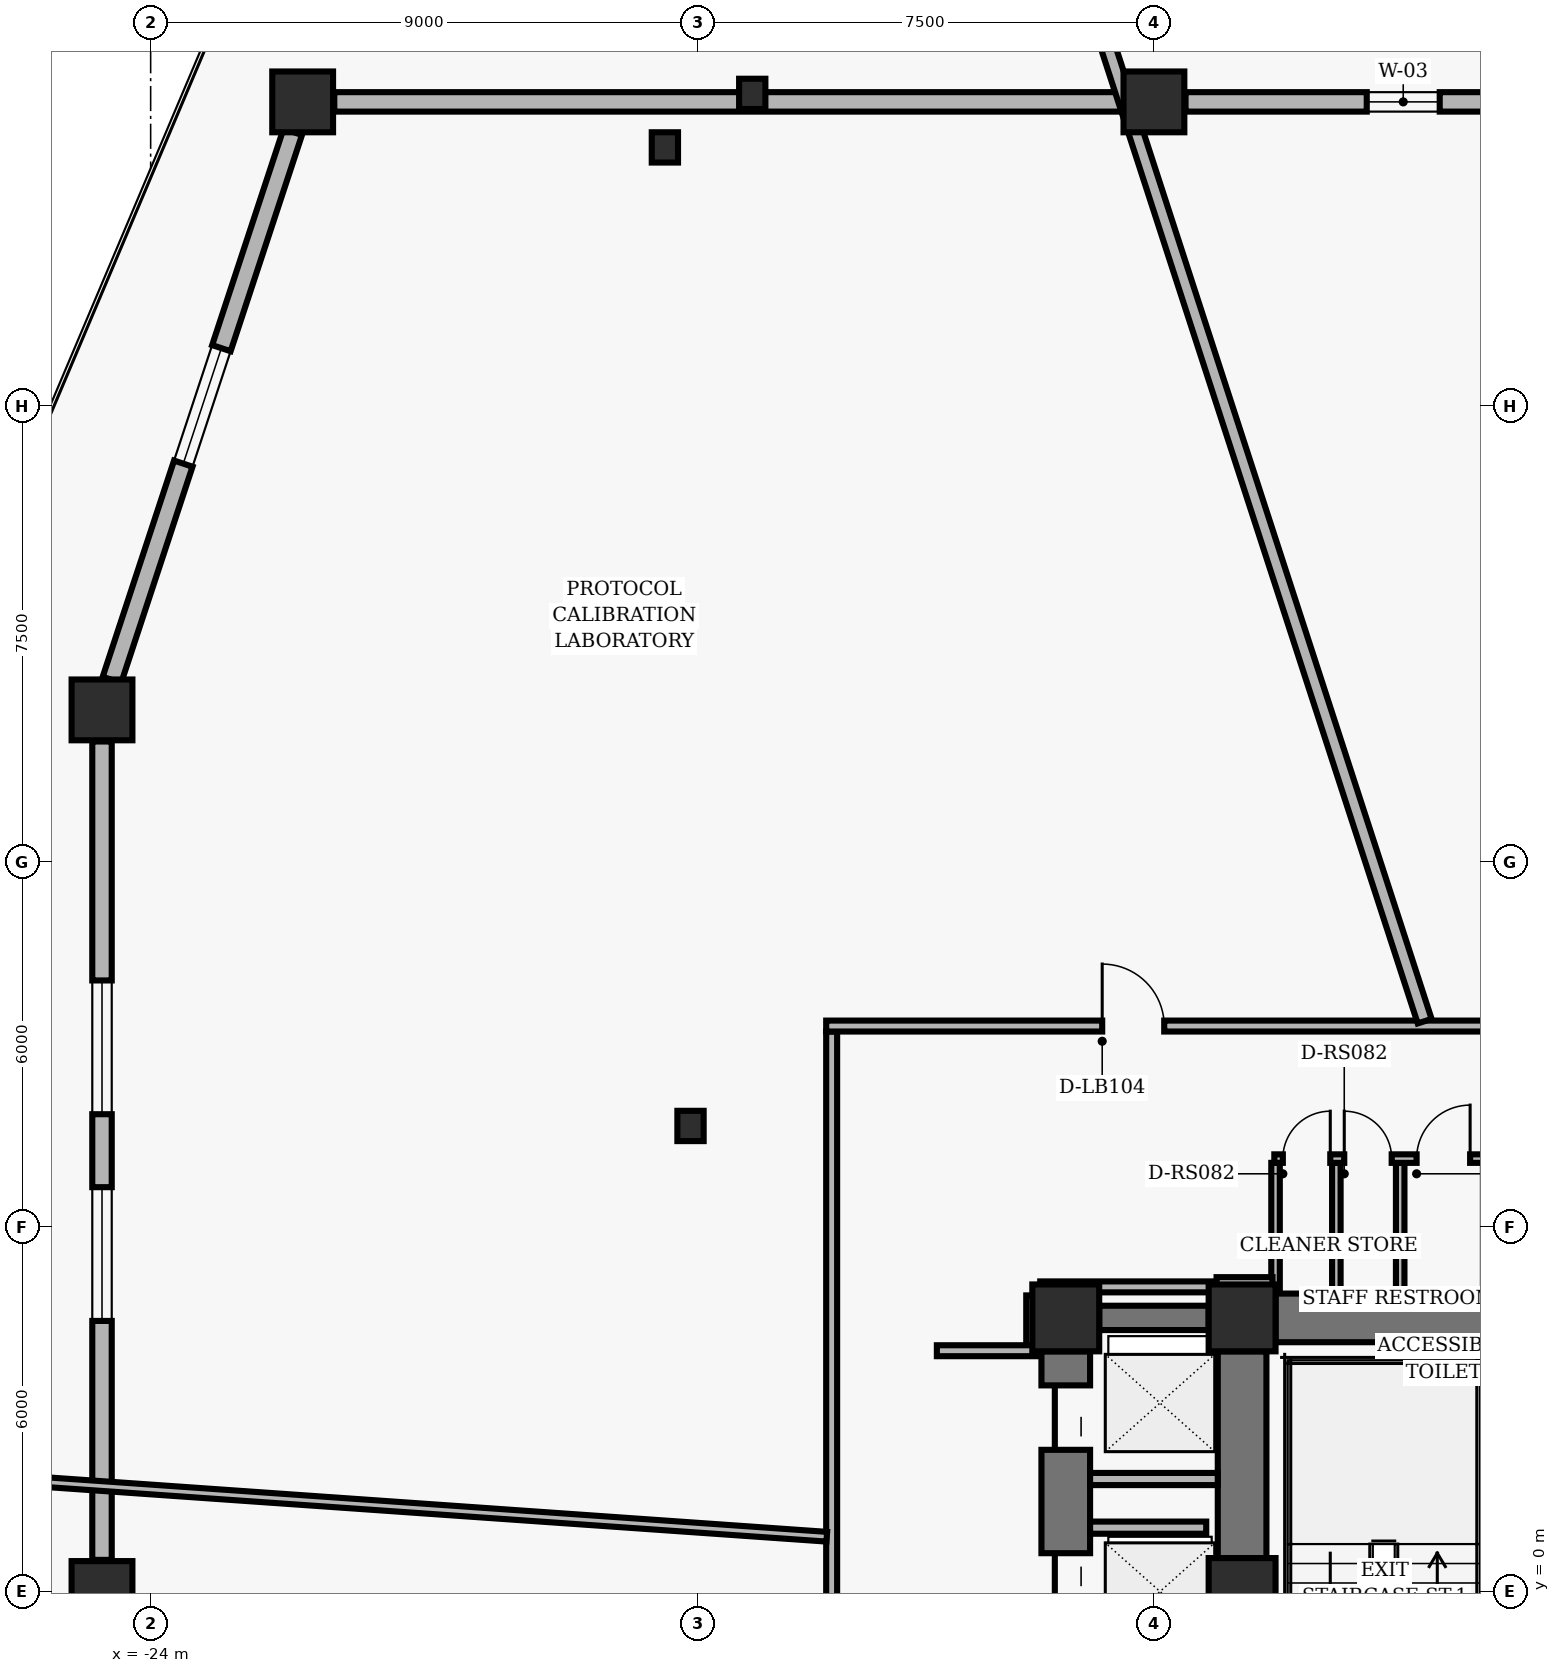
"""IFC4 building model, lengths in metres.
Left out: names, types, materials, properties, quantities, classifications, styles, units other than length and angle.
Written with IfcOpenShell. Run it as: python <this file> out.ifc"""

import sys

from ifc_helpers import new_model, si_unit, direction, frame, frame_2d, origin, origin_2d, place, context, subcontext, project, spatial, rectangle, hollow_rectangle, i_section, extrude, element, fill, save


model = new_model("IFC4")
c1 = context("Model", 3, precision=1e-05, world=origin(), true_north=direction((0.0, 1.0)))
c2 = subcontext(c1, "Body", "Model", "MODEL_VIEW")
j1 = project(units=[si_unit("LENGTHUNIT", "METRE"), si_unit("PLANEANGLEUNIT", "RADIAN")], contexts=[c1])
p1 = place(None, origin())
s1 = spatial("IfcSite", under=j1, at=p1, CompositionType="ELEMENT")
p2 = place(p1, origin())
s2 = spatial("IfcBuilding", under=s1, at=p2, CompositionType="ELEMENT")
p3 = place(p2, frame((0.0, 0.0, 11.84)))
s3 = spatial("IfcBuildingStorey", under=s2, at=p3, CompositionType="ELEMENT", Elevation=11.84)
for number, where, z_axis, x_axis in (
    (1, (-6.05, 4.5, 0.0), (0.0, 0.0, 1.0), (1.0, 0.0, 0.0)),
    (2, (-6.05, 0.0, 0.0), (0.0, 0.0, 1.0), (1.0, 0.0, 0.0)),
    (3, (-8.95, 4.5, 0.0), (0.0, 0.0, 1.0), (1.0, 0.0, 0.0)),
):
    element("IfcColumn", number, at=place(p3, frame(where, z_axis=z_axis, x_axis=x_axis)), inside=s3, PredefinedType="COLUMN", context=c2, shape_type="SweptSolid", body=[
        extrude(hollow_rectangle(XDim=1.1, YDim=1.1, WallThickness=0.07, InnerFilletRadius=0.02, OuterFilletRadius=0.04, at=origin_2d()), origin(), (0.0, 0.0, 1.0), 3.52),
    ])
p4 = place(p3, frame((-6.05, 0.55, 0.0), z_axis=(0.0, 0.0, 1.0), x_axis=(0.0, 1.0, 0.0)))
e4 = element("IfcWall", 4, at=p4, inside=s3, PredefinedType="SHEAR", context=c2, shape_type="SweptSolid", body=[
    extrude(rectangle(XDim=3.4, YDim=0.8, at=frame_2d((1.7, 0.0))), origin(), (0.0, 0.0, 1.0), 3.178),
])
p5 = place(p3, frame((-5.5, 4.5, 0.0), z_axis=(0.0, 0.0, 1.0), x_axis=(1.0, 0.0, 0.0)))
e5 = element("IfcWall", 5, at=p5, inside=s3, PredefinedType="SHEAR", context=c2, shape_type="SweptSolid", body=[
    extrude(rectangle(XDim=3.45, YDim=0.8, at=frame_2d((1.725, 0.0))), origin(), (0.0, 0.0, 1.0), 3.178),
])
p6 = place(p3, frame((-8.95, -3.75, 0.0), z_axis=(0.0, 0.0, 1.0), x_axis=(0.0, 1.0, 0.0)))
e6 = element("IfcWall", 6, at=p6, inside=s3, PredefinedType="SHEAR", context=c2, shape_type="SweptSolid", body=[
    extrude(rectangle(XDim=7.7, YDim=0.8, at=frame_2d((3.85, 0.0))), origin(), (0.0, 0.0, 1.0), 3.178),
])
p7 = place(p6, frame((0.55, 0.0, 0.0)))
e7 = element("IfcOpeningElement", 7, at=p7, cuts=e6, PredefinedType="OPENING", context=c2, shape_type="SweptSolid", body=[
    extrude(rectangle(XDim=1.06, YDim=2.04, at=frame_2d((0.53, 1.02))), frame((0.0, 0.41, 0.0), z_axis=(0.0, -1.0, 0.0), x_axis=(1.0, 0.0, 0.0)), (0.0, 0.0, 1.0), 0.82),
])
p8 = place(p6, frame((3.32, 0.0, 0.0)))
e8 = element("IfcOpeningElement", 8, at=p8, cuts=e6, PredefinedType="OPENING", context=c2, shape_type="SweptSolid", body=[
    extrude(rectangle(XDim=1.06, YDim=2.04, at=frame_2d((0.53, 1.02))), frame((0.0, 0.41, 0.0), z_axis=(0.0, -1.0, 0.0), x_axis=(1.0, 0.0, 0.0)), (0.0, 0.0, 1.0), 0.82),
])
p9 = place(p6, frame((6.08, 0.0, 0.0)))
e9 = element("IfcOpeningElement", 9, at=p9, cuts=e6, PredefinedType="OPENING", context=c2, shape_type="SweptSolid", body=[
    extrude(rectangle(XDim=1.06, YDim=2.04, at=frame_2d((0.53, 1.02))), frame((0.0, 0.41, 0.0), z_axis=(0.0, -1.0, 0.0), x_axis=(1.0, 0.0, 0.0)), (0.0, 0.0, 1.0), 0.82),
])
p10 = place(p3, frame((-8.4, 4.5, 0.0), z_axis=(0.0, 0.0, 1.0), x_axis=(1.0, 0.0, 0.0)))
e10 = element("IfcWall", 10, at=p10, inside=s3, PredefinedType="SHEAR", context=c2, shape_type="SweptSolid", body=[
    extrude(rectangle(XDim=1.8, YDim=0.4, at=frame_2d((0.9, 0.0))), origin(), (0.0, 0.0, 1.0), 3.178),
])
for number, where, z_axis, x_axis in (
    (11, (-7.5, 24.5, 0.0), (0.0, 0.0, 1.0), (1.0, 0.0, 0.0)),
    (12, (-21.5, 24.5, 0.0), (0.0, 0.0, 1.0), (1.0, 0.0, 0.0)),
    (13, (-24.8, 14.5, 0.0), (0.0, 0.0, 1.0), (1.0, 0.0, 0.0)),
    (14, (-24.8, 0.0, 0.0), (0.0, 0.0, 1.0), (1.0, 0.0, 0.0)),
):
    element("IfcColumn", number, at=place(p3, frame(where, z_axis=z_axis, x_axis=x_axis)), inside=s3, PredefinedType="COLUMN", context=c2, shape_type="SweptSolid", body=[
        extrude(rectangle(XDim=1.0, YDim=1.0, at=origin_2d()), origin(), (0.0, 0.0, 1.0), 3.52),
    ])
for number, where, z_axis, x_axis in (
    (15, (-14.106, 24.632, 0.0), (0.0, 0.0, 1.0), (1.0, 0.0, 0.0)),
    (16, (-15.543, 23.751, 0.0), (0.0, 0.0, 1.0), (1.0, 0.0, 0.0)),
    (17, (-15.121, 7.657, 0.0), (0.0, 0.0, 1.0), (1.0, 0.0, 0.0)),
):
    element("IfcColumn", number, at=place(p3, frame(where, z_axis=z_axis, x_axis=x_axis)), inside=s3, PredefinedType="COLUMN", context=c2, shape_type="SweptSolid", body=[
        extrude(i_section(OverallWidth=0.432, OverallDepth=0.498, WebThickness=0.056, FlangeThickness=0.089, FilletRadius=0.025, at=origin_2d()), origin(), (0.0, 0.0, 1.0), 3.52),
    ])
p11 = place(p3, frame((-6.98, 24.5, 0.0), z_axis=(0.0, 0.0, 1.0), x_axis=(1.0, 0.0, 0.0)))
e18 = element("IfcWall", 18, at=p11, inside=s3, PredefinedType="SOLIDWALL", context=c2, shape_type="SweptSolid", body=[
    extrude(rectangle(XDim=11.96, YDim=0.32, at=frame_2d((5.98, 0.0))), origin(), (0.0, 0.0, 1.0), 2.548),
])
p12 = place(p11, frame((2.98, 0.0, 0.65)))
e19 = element("IfcOpeningElement", 19, at=p12, cuts=e18, PredefinedType="OPENING", context=c2, shape_type="SweptSolid", body=[
    extrude(rectangle(XDim=1.2, YDim=1.6, at=frame_2d((0.6, 0.8))), frame((0.0, 0.17, 0.0), z_axis=(0.0, -1.0, 0.0), x_axis=(1.0, 0.0, 0.0)), (0.0, 0.0, 1.0), 0.34),
])
p13 = place(p11, frame((5.38, 0.0, 0.65)))
e20 = element("IfcOpeningElement", 20, at=p13, cuts=e18, PredefinedType="OPENING", context=c2, shape_type="SweptSolid", body=[
    extrude(rectangle(XDim=1.2, YDim=1.6, at=frame_2d((0.6, 0.8))), frame((0.0, 0.17, 0.0), z_axis=(0.0, -1.0, 0.0), x_axis=(1.0, 0.0, 0.0)), (0.0, 0.0, 1.0), 0.34),
])
p14 = place(p11, frame((7.78, 0.0, 0.65)))
e21 = element("IfcOpeningElement", 21, at=p14, cuts=e18, PredefinedType="OPENING", context=c2, shape_type="SweptSolid", body=[
    extrude(rectangle(XDim=1.2, YDim=1.6, at=frame_2d((0.6, 0.8))), frame((0.0, 0.17, 0.0), z_axis=(0.0, -1.0, 0.0), x_axis=(1.0, 0.0, 0.0)), (0.0, 0.0, 1.0), 0.34),
])
p15 = place(p3, frame((-20.98, 24.5, 0.0), z_axis=(0.0, 0.0, 1.0), x_axis=(1.0, 0.0, 0.0)))
e22 = element("IfcWall", 22, at=p15, inside=s3, PredefinedType="SOLIDWALL", context=c2, shape_type="SweptSolid", body=[
    extrude(rectangle(XDim=12.96, YDim=0.32, at=frame_2d((6.48, 0.0))), origin(), (0.0, 0.0, 1.0), 2.548),
])
p16 = place(p3, frame((-24.637, 14.994, 0.0), z_axis=(0.0, 0.0, 1.0), x_axis=(0.313363070681, 0.949633395544, 0.0)))
e23 = element("IfcWall", 23, at=p16, inside=s3, PredefinedType="SOLIDWALL", context=c2, shape_type="SweptSolid", body=[
    extrude(rectangle(XDim=9.49, YDim=0.32, at=frame_2d((4.745, 0.0))), origin(), (0.0, 0.0, 1.0), 2.548),
])
p17 = place(p16, frame((3.745, 0.0, 0.65)))
e24 = element("IfcOpeningElement", 24, at=p17, cuts=e23, PredefinedType="OPENING", context=c2, shape_type="SweptSolid", body=[
    extrude(rectangle(XDim=2.0, YDim=1.6, at=frame_2d((1.0, 0.8))), frame((0.0, 0.17, 0.0), z_axis=(0.0, -1.0, 0.0), x_axis=(1.0, 0.0, 0.0)), (0.0, 0.0, 1.0), 0.34),
])
p18 = place(p3, frame((-24.8, 0.52, 0.0), z_axis=(0.0, 0.0, 1.0), x_axis=(0.0, 1.0, 0.0)))
e25 = element("IfcWall", 25, at=p18, inside=s3, PredefinedType="SOLIDWALL", context=c2, shape_type="SweptSolid", body=[
    extrude(rectangle(XDim=13.46, YDim=0.32, at=frame_2d((6.73, 0.0))), origin(), (0.0, 0.0, 1.0), 2.221),
])
p19 = place(p18, frame((3.93, 0.0, 0.4)))
e26 = element("IfcOpeningElement", 26, at=p19, cuts=e25, PredefinedType="OPENING", context=c2, shape_type="SweptSolid", body=[
    extrude(rectangle(XDim=2.2, YDim=1.1, at=frame_2d((1.1, 0.55))), frame((0.0, 0.17, 0.0), z_axis=(0.0, -1.0, 0.0), x_axis=(1.0, 0.0, 0.0)), (0.0, 0.0, 1.0), 0.34),
])
p20 = place(p18, frame((7.33, 0.0, 0.4)))
e27 = element("IfcOpeningElement", 27, at=p20, cuts=e25, PredefinedType="OPENING", context=c2, shape_type="SweptSolid", body=[
    extrude(rectangle(XDim=2.2, YDim=1.1, at=frame_2d((1.1, 0.55))), frame((0.0, 0.17, 0.0), z_axis=(0.0, -1.0, 0.0), x_axis=(1.0, 0.0, 0.0)), (0.0, 0.0, 1.0), 0.34),
])
for number, where, z_axis, x_axis in (
    (28, (-5.5, 4.95, 0.0), (0.0, 0.0, 1.0), (0.0, 1.0, 0.0)),
    (29, (-4.5, 4.95, 0.0), (0.0, 0.0, 1.0), (0.0, 1.0, 0.0)),
    (30, (-3.45, 4.95, 0.0), (0.0, 0.0, 1.0), (0.0, 1.0, 0.0)),
):
    element("IfcWall", number, at=place(p3, frame(where, z_axis=z_axis, x_axis=x_axis)), inside=s3, PredefinedType="PARTITIONING", context=c2, shape_type="SweptSolid", body=[
        extrude(rectangle(XDim=2.1, YDim=0.14, at=frame_2d((1.05, 0.0))), origin(), (0.0, 0.0, 1.0), 3.153),
    ])
p21 = place(p3, frame((-5.52, 7.12, 0.0), z_axis=(0.0, 0.0, 1.0), x_axis=(1.0, 0.0, 0.0)))
e31 = element("IfcWall", 31, at=p21, inside=s3, PredefinedType="PARTITIONING", context=c2, shape_type="SweptSolid", body=[
    extrude(rectangle(XDim=3.52, YDim=0.14, at=frame_2d((1.76, 0.0))), origin(), (0.0, 0.0, 1.0), 3.153),
])
p22 = place(p21, frame((0.14, 0.0, 0.0)))
e32 = element("IfcOpeningElement", 32, at=p22, cuts=e31, PredefinedType="OPENING", context=c2, shape_type="SweptSolid", body=[
    extrude(rectangle(XDim=0.78, YDim=2.01, at=frame_2d((0.39, 1.005))), frame((0.0, 0.08, 0.0), z_axis=(0.0, -1.0, 0.0), x_axis=(1.0, 0.0, 0.0)), (0.0, 0.0, 1.0), 0.16),
])
p23 = place(p21, frame((1.15, 0.0, 0.0)))
e33 = element("IfcOpeningElement", 33, at=p23, cuts=e31, PredefinedType="OPENING", context=c2, shape_type="SweptSolid", body=[
    extrude(rectangle(XDim=0.78, YDim=2.01, at=frame_2d((0.39, 1.005))), frame((0.0, 0.08, 0.0), z_axis=(0.0, -1.0, 0.0), x_axis=(1.0, 0.0, 0.0)), (0.0, 0.0, 1.0), 0.16),
])
p24 = place(p21, frame((2.34, 0.0, 0.0)))
e34 = element("IfcOpeningElement", 34, at=p24, cuts=e31, PredefinedType="OPENING", context=c2, shape_type="SweptSolid", body=[
    extrude(rectangle(XDim=0.88, YDim=2.02, at=frame_2d((0.44, 1.01))), frame((0.0, 0.08, 0.0), z_axis=(0.0, -1.0, 0.0), x_axis=(1.0, 0.0, 0.0)), (0.0, 0.0, 1.0), 0.16),
])
p25 = place(p3, frame((-8.55, 1.85, 0.0), z_axis=(0.0, 0.0, 1.0), x_axis=(1.0, 0.0, 0.0)))
e35 = element("IfcWall", 35, at=p25, inside=s3, PredefinedType="PARTITIONING", context=c2, shape_type="SweptSolid", body=[
    extrude(rectangle(XDim=2.1, YDim=0.2, at=frame_2d((1.05, 0.0))), origin(), (0.0, 0.0, 1.0), 3.153),
])
p26 = place(p3, frame((-8.55, 1.05, 0.0), z_axis=(0.0, 0.0, 1.0), x_axis=(1.0, 0.0, 0.0)))
e36 = element("IfcWall", 36, at=p26, inside=s3, PredefinedType="PARTITIONING", context=c2, shape_type="SweptSolid", body=[
    extrude(rectangle(XDim=1.91, YDim=0.2, at=frame_2d((0.955, 0.0))), origin(), (0.0, 0.0, 1.0), 3.153),
])
p27 = place(p3, frame((-12.8, -3.61, 0.0), z_axis=(0.0, 0.0, 1.0), x_axis=(0.0, 1.0, 0.0)))
e37 = element("IfcWall", 37, at=p27, inside=s3, PredefinedType="PARTITIONING", context=c2, shape_type="SweptSolid", body=[
    extrude(rectangle(XDim=12.82, YDim=0.18, at=frame_2d((6.41, 0.0))), origin(), (0.0, 0.0, 1.0), 3.153),
])
p28 = place(p3, frame((-12.89, 9.3, 0.0), z_axis=(0.0, 0.0, 1.0), x_axis=(1.0, 0.0, 0.0)))
e38 = element("IfcWall", 38, at=p28, inside=s3, PredefinedType="PARTITIONING", context=c2, shape_type="SweptSolid", body=[
    extrude(rectangle(XDim=25.78, YDim=0.18, at=frame_2d((12.89, 0.0))), origin(), (0.0, 0.0, 1.0), 2.72),
])
p29 = place(p28, frame((17.202, 0.0, 0.0)))
e39 = element("IfcOpeningElement", 39, at=p29, cuts=e38, PredefinedType="OPENING", context=c2, shape_type="SweptSolid", body=[
    extrude(rectangle(XDim=0.96, YDim=2.02, at=frame_2d((0.48, 1.01))), frame((0.0, 0.1, 0.0), z_axis=(0.0, -1.0, 0.0), x_axis=(1.0, 0.0, 0.0)), (0.0, 0.0, 1.0), 0.2),
])
p30 = place(p28, frame((4.539, 0.0, 0.0)))
e40 = element("IfcOpeningElement", 40, at=p30, cuts=e38, PredefinedType="OPENING", context=c2, shape_type="SweptSolid", body=[
    extrude(rectangle(XDim=1.02, YDim=2.02, at=frame_2d((0.51, 1.01))), frame((0.0, 0.1, 0.0), z_axis=(0.0, -1.0, 0.0), x_axis=(1.0, 0.0, 0.0)), (0.0, 0.0, 1.0), 0.2),
])
p31 = place(p3, frame((-5.55, 5.08, 0.0), z_axis=(0.0, 0.0, 1.0), x_axis=(-1.0, 0.0, 0.0)))
e41 = element("IfcWall", 41, at=p31, inside=s3, PredefinedType="PARTITIONING", context=c2, shape_type="SweptSolid", body=[
    extrude(rectangle(XDim=0.92, YDim=0.18, at=frame_2d((0.46, 0.0))), origin(), (0.0, 0.0, 1.0), 3.153),
])
p32 = place(p3, frame((-6.562, 5.01, 0.0), z_axis=(0.0, 0.0, 1.0), x_axis=(-1.0, 0.0, 0.0)))
e42 = element("IfcWall", 42, at=p32, inside=s3, PredefinedType="PARTITIONING", context=c2, shape_type="SweptSolid", body=[
    extrude(rectangle(XDim=2.808, YDim=0.18, at=frame_2d((1.404, 0.0))), origin(), (0.0, 0.0, 1.0), 3.153),
])
p33 = place(p3, frame((-9.51, 4.87, 0.0), z_axis=(0.0, 0.0, 1.0), x_axis=(0.0, -1.0, 0.0)))
e43 = element("IfcWall", 43, at=p33, inside=s3, PredefinedType="PARTITIONING", context=c2, shape_type="SweptSolid", body=[
    extrude(rectangle(XDim=0.82, YDim=0.18, at=frame_2d((0.41, 0.0))), origin(), (0.0, 0.0, 1.0), 3.153),
])
p34 = place(p3, frame((-9.42, 3.96, 0.0), z_axis=(0.0, 0.0, 1.0), x_axis=(-1.0, 0.0, 0.0)))
e44 = element("IfcWall", 44, at=p34, inside=s3, PredefinedType="PARTITIONING", context=c2, shape_type="SweptSolid", body=[
    extrude(rectangle(XDim=1.65, YDim=0.18, at=frame_2d((0.825, 0.0))), origin(), (0.0, 0.0, 1.0), 3.153),
])
p35 = place(p3, frame((-3.048, 9.38, 0.0), z_axis=(0.0, 0.0, 1.0), x_axis=(-0.309026872476, 0.951053306649, 0.0)))
e45 = element("IfcWall", 45, at=p35, inside=s3, PredefinedType="PARTITIONING", context=c2, shape_type="SweptSolid", body=[
    extrude(rectangle(XDim=18.464, YDim=0.24, at=frame_2d((9.232, 0.0))), origin(), (0.0, 0.0, 1.0), 2.206),
])
p36 = place(p3, frame((-12.88, 0.901, 0.0), z_axis=(0.0, 0.0, 1.0), x_axis=(-0.99756431173, 0.069752734445, 0.0)))
e46 = element("IfcWall", 46, at=p36, inside=s3, PredefinedType="PARTITIONING", context=c2, shape_type="SweptSolid", body=[
    extrude(rectangle(XDim=13.643, YDim=0.16, at=frame_2d((6.822, 0.0))), origin(), (0.0, 0.0, 1.0), 3.153),
])
p37 = place(p12, origin())
e47 = element("IfcWindow", 47, at=p37, inside=s3, PartitioningType="SINGLE_PANEL", PredefinedType="WINDOW", context=c2, shape_type="SweptSolid", body=[
    extrude(rectangle(XDim=1.2, YDim=1.6, at=frame_2d((0.6, 0.8))), frame((0.0, 0.03, 0.0), z_axis=(0.0, -1.0, 0.0), x_axis=(1.0, 0.0, 0.0)), (0.0, 0.0, 1.0), 0.06),
])
fill(e19, e47)
p38 = place(p17, origin())
e48 = element("IfcWindow", 48, at=p38, inside=s3, PartitioningType="SINGLE_PANEL", PredefinedType="WINDOW", context=c2, shape_type="SweptSolid", body=[
    extrude(rectangle(XDim=2.0, YDim=1.6, at=frame_2d((1.0, 0.8))), frame((0.0, 0.03, 0.0), z_axis=(0.0, -1.0, 0.0), x_axis=(1.0, 0.0, 0.0)), (0.0, 0.0, 1.0), 0.06),
])
fill(e24, e48)
p39 = place(p19, origin())
e49 = element("IfcWindow", 49, at=p39, inside=s3, PartitioningType="SINGLE_PANEL", PredefinedType="WINDOW", context=c2, shape_type="SweptSolid", body=[
    extrude(rectangle(XDim=2.2, YDim=1.1, at=frame_2d((1.1, 0.55))), frame((0.0, 0.03, 0.0), z_axis=(0.0, -1.0, 0.0), x_axis=(1.0, 0.0, 0.0)), (0.0, 0.0, 1.0), 0.06),
])
fill(e26, e49)
p40 = place(p20, origin())
e50 = element("IfcWindow", 50, at=p40, inside=s3, PartitioningType="SINGLE_PANEL", PredefinedType="WINDOW", context=c2, shape_type="SweptSolid", body=[
    extrude(rectangle(XDim=2.2, YDim=1.1, at=frame_2d((1.1, 0.55))), frame((0.0, 0.03, 0.0), z_axis=(0.0, -1.0, 0.0), x_axis=(1.0, 0.0, 0.0)), (0.0, 0.0, 1.0), 0.06),
])
fill(e27, e50)
p41 = place(p22, origin())
e51 = element("IfcDoor", 51, at=p41, inside=s3, OperationType="SINGLE_SWING_RIGHT", PredefinedType="DOOR", context=c2, shape_type="SweptSolid", body=[
    extrude(rectangle(XDim=0.78, YDim=2.01, at=frame_2d((0.39, 1.005))), frame((0.0, 0.025, 0.0), z_axis=(0.0, -1.0, 0.0), x_axis=(1.0, 0.0, 0.0)), (0.0, 0.0, 1.0), 0.05),
])
fill(e32, e51)
p42 = place(p23, origin())
e52 = element("IfcDoor", 52, at=p42, inside=s3, OperationType="SINGLE_SWING_LEFT", PredefinedType="DOOR", context=c2, shape_type="SweptSolid", body=[
    extrude(rectangle(XDim=0.78, YDim=2.01, at=frame_2d((0.39, 1.005))), frame((0.0, 0.025, 0.0), z_axis=(0.0, -1.0, 0.0), x_axis=(1.0, 0.0, 0.0)), (0.0, 0.0, 1.0), 0.05),
])
fill(e33, e52)
p43 = place(p24, origin())
e53 = element("IfcDoor", 53, at=p43, inside=s3, OperationType="SINGLE_SWING_RIGHT", PredefinedType="DOOR", context=c2, shape_type="SweptSolid", body=[
    extrude(rectangle(XDim=0.88, YDim=2.02, at=frame_2d((0.44, 1.01))), frame((0.0, 0.025, 0.0), z_axis=(0.0, -1.0, 0.0), x_axis=(1.0, 0.0, 0.0)), (0.0, 0.0, 1.0), 0.05),
])
fill(e34, e53)
p44 = place(p8, origin())
e54 = element("IfcDoor", 54, at=p44, inside=s3, OperationType="SLIDING_TO_RIGHT", PredefinedType="DOOR", context=c2, shape_type="SweptSolid", body=[
    extrude(rectangle(XDim=1.06, YDim=2.04, at=frame_2d((0.53, 1.02))), frame((0.0, 0.025, 0.0), z_axis=(0.0, -1.0, 0.0), x_axis=(1.0, 0.0, 0.0)), (0.0, 0.0, 1.0), 0.05),
])
fill(e8, e54)
p45 = place(p9, origin())
e55 = element("IfcDoor", 55, at=p45, inside=s3, OperationType="SLIDING_TO_LEFT", PredefinedType="DOOR", context=c2, shape_type="SweptSolid", body=[
    extrude(rectangle(XDim=1.06, YDim=2.04, at=frame_2d((0.53, 1.02))), frame((0.0, 0.025, 0.0), z_axis=(0.0, -1.0, 0.0), x_axis=(1.0, 0.0, 0.0)), (0.0, 0.0, 1.0), 0.05),
])
fill(e9, e55)
p46 = place(p30, origin())
e56 = element("IfcDoor", 56, at=p46, inside=s3, OperationType="SINGLE_SWING_LEFT", PredefinedType="DOOR", context=c2, shape_type="SweptSolid", body=[
    extrude(rectangle(XDim=1.02, YDim=2.02, at=frame_2d((0.51, 1.01))), frame((0.0, 0.025, 0.0), z_axis=(0.0, -1.0, 0.0), x_axis=(1.0, 0.0, 0.0)), (0.0, 0.0, 1.0), 0.05),
])
fill(e40, e56)
save(model, sys.argv[1])
